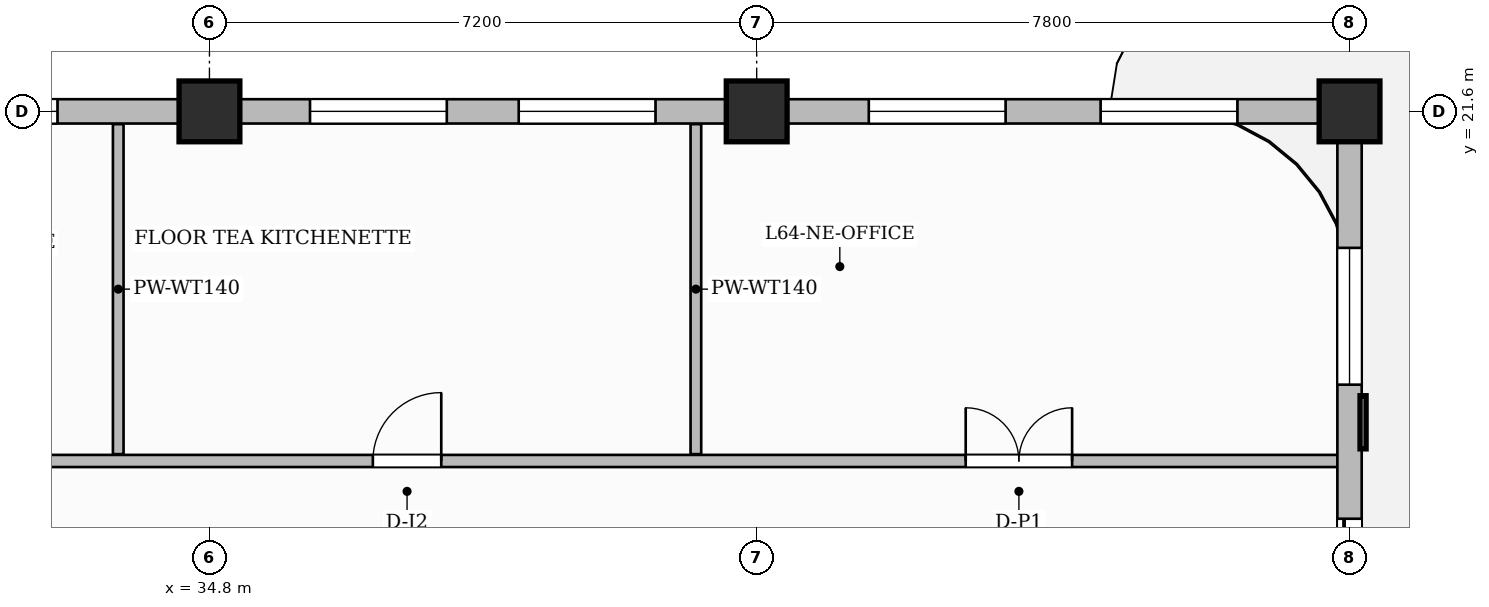
"""IFC4 building model, lengths in metres.
Left out: names, types, materials, properties, quantities, classifications, styles, units other than length and angle.
Written with IfcOpenShell. Run it as: python <this file> out.ifc"""

import sys

from ifc_helpers import new_model, si_unit, direction, frame, frame_2d, origin, origin_2d, place, context, subcontext, project, spatial, rectangle, extrude, source, transform, mapped, element, fill, save


model = new_model("IFC4")
c1 = context("Model", 3, precision=1e-05, world=origin(), true_north=direction((0.0, 1.0)))
c2 = subcontext(c1, "Body", "Model", "MODEL_VIEW")
j1 = project(units=[si_unit("LENGTHUNIT", "METRE"), si_unit("PLANEANGLEUNIT", "RADIAN")], contexts=[c1])
p1 = place(None, origin())
s1 = spatial("IfcSite", under=j1, at=p1, CompositionType="ELEMENT")
p2 = place(p1, origin())
s2 = spatial("IfcBuilding", under=s1, at=p2, CompositionType="ELEMENT")
p3 = place(p2, frame((0.0, 0.0, 255.8)))
s3 = spatial("IfcBuildingStorey", under=s2, at=p3, CompositionType="ELEMENT", Elevation=255.8)
m1 = source(origin(), c2, "Body", "SweptSolid", [
    extrude(rectangle(XDim=0.8, YDim=0.8, at=origin_2d()), origin(), (0.0, 0.0, 1.0), 3.85),
])
for number, where, z_axis, x_axis in (
    (1, (34.8, 21.6, 0.0), (0.0, 0.0, 1.0), (1.0, 0.0, 0.0)),
    (2, (42.0, 21.6, 0.0), (0.0, 0.0, 1.0), (1.0, 0.0, 0.0)),
    (3, (49.8, 21.6, 0.0), (0.0, 0.0, 1.0), (1.0, 0.0, 0.0)),
):
    element("IfcColumn", number, at=place(p3, frame(where, z_axis=z_axis, x_axis=x_axis)), inside=s3, PredefinedType="COLUMN", context=c2, shape_type="MappedRepresentation", body=[
        mapped(m1, transform((0.0, 0.0, 0.0), scale=1.0)),
    ])
p4 = place(p3, frame((30.29, 17.0, 0.0), z_axis=(0.0, 0.0, 1.0), x_axis=(1.0, 0.0, 0.0)))
e4 = element("IfcWall", 4, at=p4, inside=s3, PredefinedType="PARTITIONING", context=c2, shape_type="SweptSolid", body=[
    extrude(rectangle(XDim=19.37, YDim=0.16, at=frame_2d((9.685, 0.0))), origin(), (0.0, 0.0, 1.0), 3.6),
])
p5 = place(p4, frame((1.185, 0.0, 0.0)))
e5 = element("IfcOpeningElement", 5, at=p5, cuts=e4, PredefinedType="OPENING", context=c2, shape_type="SweptSolid", body=[
    extrude(rectangle(XDim=0.85, YDim=2.1, at=frame_2d((0.425, 1.05))), frame((0.0, 0.09, 0.0), z_axis=(0.0, -1.0, 0.0), x_axis=(1.0, 0.0, 0.0)), (0.0, 0.0, 1.0), 0.18),
])
p6 = place(p4, frame((6.66, 0.0, 0.0)))
e6 = element("IfcOpeningElement", 6, at=p6, cuts=e4, PredefinedType="OPENING", context=c2, shape_type="SweptSolid", body=[
    extrude(rectangle(XDim=0.9, YDim=2.15, at=frame_2d((0.45, 1.075))), frame((0.0, 0.09, 0.0), z_axis=(0.0, -1.0, 0.0), x_axis=(1.0, 0.0, 0.0)), (0.0, 0.0, 1.0), 0.18),
])
p7 = place(p4, frame((14.46, 0.0, 0.0)))
e7 = element("IfcOpeningElement", 7, at=p7, cuts=e4, PredefinedType="OPENING", context=c2, shape_type="SweptSolid", body=[
    extrude(rectangle(XDim=1.4, YDim=2.35, at=frame_2d((0.7, 1.175))), frame((0.0, 0.09, 0.0), z_axis=(0.0, -1.0, 0.0), x_axis=(1.0, 0.0, 0.0)), (0.0, 0.0, 1.0), 0.18),
])
for number, where, z_axis, x_axis in (
    (8, (33.6, 17.09, 0.0), (0.0, 0.0, 1.0), (0.0, 1.0, 0.0)),
    (9, (41.2, 17.09, 0.0), (0.0, 0.0, 1.0), (0.0, 1.0, 0.0)),
):
    element("IfcWall", number, at=place(p3, frame(where, z_axis=z_axis, x_axis=x_axis)), inside=s3, PredefinedType="PARTITIONING", context=c2, shape_type="SweptSolid", body=[
        extrude(rectangle(XDim=4.342, YDim=0.14, at=frame_2d((2.171, 0.0))), origin(), (0.0, 0.0, 1.0), 3.6),
    ])
p8 = place(p3, frame((49.8, 14.62, 0.0), z_axis=(0.0, 0.0, 1.0), x_axis=(0.0, 1.0, 0.0)))
e10 = element("IfcWall", 10, at=p8, inside=s3, PredefinedType="SOLIDWALL", context=c2, shape_type="SweptSolid", body=[
    extrude(rectangle(XDim=6.93, YDim=0.32, at=frame_2d((3.465, 0.0))), origin(), (0.0, 0.0, 1.0), 3.135),
])
p9 = place(p8, frame((0.42, 0.0, 0.0)))
e11 = element("IfcOpeningElement", 11, at=p9, cuts=e10, PredefinedType="OPENING", context=c2, shape_type="SweptSolid", body=[
    extrude(rectangle(XDim=1.2, YDim=2.2, at=frame_2d((0.6, 1.1))), frame((0.0, 0.17, 0.0), z_axis=(0.0, -1.0, 0.0), x_axis=(1.0, 0.0, 0.0)), (0.0, 0.0, 1.0), 0.34),
])
p10 = place(p8, frame((3.384, 0.0, 0.8)))
e12 = element("IfcOpeningElement", 12, at=p10, cuts=e10, PredefinedType="OPENING", context=c2, shape_type="SweptSolid", body=[
    extrude(rectangle(XDim=1.8, YDim=1.85, at=frame_2d((0.9, 0.925))), frame((0.0, 0.17, 0.0), z_axis=(0.0, -1.0, 0.0), x_axis=(1.0, 0.0, 0.0)), (0.0, 0.0, 1.0), 0.34),
])
p11 = place(p3, frame((18.0, 21.6, 0.0), z_axis=(0.0, 0.0, 1.0), x_axis=(1.0, 0.0, 0.0)))
e13 = element("IfcWall", 13, at=p11, inside=s3, PredefinedType="SOLIDWALL", context=c2, shape_type="SweptSolid", body=[
    extrude(rectangle(XDim=31.8, YDim=0.32, at=frame_2d((15.9, 0.0))), origin(), (0.0, 0.0, 1.0), 3.135),
])
p12 = place(p11, frame((0.42, 0.0, 0.0)))
e14 = element("IfcOpeningElement", 14, at=p12, cuts=e13, PredefinedType="OPENING", context=c2, shape_type="SweptSolid", body=[
    extrude(rectangle(XDim=1.2, YDim=2.2, at=frame_2d((0.6, 1.1))), frame((0.0, 0.17, 0.0), z_axis=(0.0, -1.0, 0.0), x_axis=(1.0, 0.0, 0.0)), (0.0, 0.0, 1.0), 0.34),
])
p13 = place(p11, frame((4.721, 0.0, 0.8)))
e15 = element("IfcOpeningElement", 15, at=p13, cuts=e13, PredefinedType="OPENING", context=c2, shape_type="SweptSolid", body=[
    extrude(rectangle(XDim=1.15, YDim=1.8, at=frame_2d((0.575, 0.9))), frame((0.0, 0.17, 0.0), z_axis=(0.0, -1.0, 0.0), x_axis=(1.0, 0.0, 0.0)), (0.0, 0.0, 1.0), 0.34),
])
p14 = place(p11, frame((7.204, 0.0, 0.8)))
e16 = element("IfcOpeningElement", 16, at=p14, cuts=e13, PredefinedType="OPENING", context=c2, shape_type="SweptSolid", body=[
    extrude(rectangle(XDim=1.8, YDim=1.85, at=frame_2d((0.9, 0.925))), frame((0.0, 0.17, 0.0), z_axis=(0.0, -1.0, 0.0), x_axis=(1.0, 0.0, 0.0)), (0.0, 0.0, 1.0), 0.34),
])
p15 = place(p11, frame((13.001, 0.0, 0.8)))
e17 = element("IfcOpeningElement", 17, at=p15, cuts=e13, PredefinedType="OPENING", context=c2, shape_type="SweptSolid", body=[
    extrude(rectangle(XDim=1.8, YDim=1.85, at=frame_2d((0.9, 0.925))), frame((0.0, 0.17, 0.0), z_axis=(0.0, -1.0, 0.0), x_axis=(1.0, 0.0, 0.0)), (0.0, 0.0, 1.0), 0.34),
])
p16 = place(p11, frame((18.123, 0.0, 0.8)))
e18 = element("IfcOpeningElement", 18, at=p16, cuts=e13, PredefinedType="OPENING", context=c2, shape_type="SweptSolid", body=[
    extrude(rectangle(XDim=1.8, YDim=1.85, at=frame_2d((0.9, 0.925))), frame((0.0, 0.17, 0.0), z_axis=(0.0, -1.0, 0.0), x_axis=(1.0, 0.0, 0.0)), (0.0, 0.0, 1.0), 0.34),
])
p17 = place(p11, frame((20.869, 0.0, 0.8)))
e19 = element("IfcOpeningElement", 19, at=p17, cuts=e13, PredefinedType="OPENING", context=c2, shape_type="SweptSolid", body=[
    extrude(rectangle(XDim=1.8, YDim=1.85, at=frame_2d((0.9, 0.925))), frame((0.0, 0.17, 0.0), z_axis=(0.0, -1.0, 0.0), x_axis=(1.0, 0.0, 0.0)), (0.0, 0.0, 1.0), 0.34),
])
p18 = place(p11, frame((25.475, 0.0, 0.8)))
e20 = element("IfcOpeningElement", 20, at=p18, cuts=e13, PredefinedType="OPENING", context=c2, shape_type="SweptSolid", body=[
    extrude(rectangle(XDim=1.8, YDim=1.85, at=frame_2d((0.9, 0.925))), frame((0.0, 0.17, 0.0), z_axis=(0.0, -1.0, 0.0), x_axis=(1.0, 0.0, 0.0)), (0.0, 0.0, 1.0), 0.34),
])
p19 = place(p11, frame((28.525, 0.0, 0.8)))
e21 = element("IfcOpeningElement", 21, at=p19, cuts=e13, PredefinedType="OPENING", context=c2, shape_type="SweptSolid", body=[
    extrude(rectangle(XDim=1.8, YDim=1.85, at=frame_2d((0.9, 0.925))), frame((0.0, 0.17, 0.0), z_axis=(0.0, -1.0, 0.0), x_axis=(1.0, 0.0, 0.0)), (0.0, 0.0, 1.0), 0.34),
])
m2 = source(origin(), c2, "Body", "SweptSolid", [
    extrude(rectangle(XDim=0.9, YDim=2.15, at=frame_2d((0.45, 1.075))), frame((0.0, 0.025, 0.0), z_axis=(0.0, -1.0, 0.0), x_axis=(1.0, 0.0, 0.0)), (0.0, 0.0, 1.0), 0.05),
])
p20 = place(p6, origin())
e22 = element("IfcDoor", 22, at=p20, inside=s3, OperationType="SINGLE_SWING_RIGHT", PredefinedType="DOOR", context=c2, shape_type="MappedRepresentation", body=[
    mapped(m2, transform((0.0, 0.0, 0.0), scale=1.0)),
])
fill(e6, e22)
m3 = source(origin(), c2, "Body", "SweptSolid", [
    extrude(rectangle(XDim=1.4, YDim=2.35, at=frame_2d((0.7, 1.175))), frame((0.0, 0.025, 0.0), z_axis=(0.0, -1.0, 0.0), x_axis=(1.0, 0.0, 0.0)), (0.0, 0.0, 1.0), 0.05),
])
p21 = place(p7, origin())
e23 = element("IfcDoor", 23, at=p21, inside=s3, OperationType="DOUBLE_DOOR_SINGLE_SWING", PredefinedType="DOOR", context=c2, shape_type="MappedRepresentation", body=[
    mapped(m3, transform((0.0, 0.0, 0.0), scale=1.0)),
])
fill(e7, e23)
m4 = source(origin(), c2, "Body", "SweptSolid", [
    extrude(rectangle(XDim=1.2, YDim=2.2, at=frame_2d((0.6, 1.1))), frame((0.0, 0.025, 0.0), z_axis=(0.0, -1.0, 0.0), x_axis=(1.0, 0.0, 0.0)), (0.0, 0.0, 1.0), 0.05),
])
p22 = place(p9, origin())
e24 = element("IfcDoor", 24, at=p22, inside=s3, OperationType="SLIDING_TO_LEFT", PredefinedType="DOOR", context=c2, shape_type="MappedRepresentation", body=[
    mapped(m4, transform((0.0, 0.0, 0.0), scale=1.0)),
])
fill(e11, e24)
m5 = source(origin(), c2, "Body", "SweptSolid", [
    extrude(rectangle(XDim=1.8, YDim=1.85, at=frame_2d((0.9, 0.925))), frame((0.0, 0.03, 0.0), z_axis=(0.0, -1.0, 0.0), x_axis=(1.0, 0.0, 0.0)), (0.0, 0.0, 1.0), 0.06),
])
p23 = place(p10, origin())
e25 = element("IfcWindow", 25, at=p23, inside=s3, PartitioningType="DOUBLE_PANEL_VERTICAL", PredefinedType="WINDOW", context=c2, shape_type="MappedRepresentation", body=[
    mapped(m5, transform((0.0, 0.0, 0.0), scale=1.0)),
])
fill(e12, e25)
p24 = place(p15, origin())
e26 = element("IfcWindow", 26, at=p24, inside=s3, PartitioningType="DOUBLE_PANEL_VERTICAL", PredefinedType="WINDOW", context=c2, shape_type="MappedRepresentation", body=[
    mapped(m5, transform((0.0, 0.0, 0.0), scale=1.0)),
])
fill(e17, e26)
p25 = place(p16, origin())
e27 = element("IfcWindow", 27, at=p25, inside=s3, PartitioningType="DOUBLE_PANEL_VERTICAL", PredefinedType="WINDOW", context=c2, shape_type="MappedRepresentation", body=[
    mapped(m5, transform((0.0, 0.0, 0.0), scale=1.0)),
])
fill(e18, e27)
p26 = place(p17, origin())
e28 = element("IfcWindow", 28, at=p26, inside=s3, PartitioningType="DOUBLE_PANEL_VERTICAL", PredefinedType="WINDOW", context=c2, shape_type="MappedRepresentation", body=[
    mapped(m5, transform((0.0, 0.0, 0.0), scale=1.0)),
])
fill(e19, e28)
p27 = place(p18, origin())
e29 = element("IfcWindow", 29, at=p27, inside=s3, PartitioningType="DOUBLE_PANEL_VERTICAL", PredefinedType="WINDOW", context=c2, shape_type="MappedRepresentation", body=[
    mapped(m5, transform((0.0, 0.0, 0.0), scale=1.0)),
])
fill(e20, e29)
p28 = place(p19, origin())
e30 = element("IfcWindow", 30, at=p28, inside=s3, PartitioningType="DOUBLE_PANEL_VERTICAL", PredefinedType="WINDOW", context=c2, shape_type="MappedRepresentation", body=[
    mapped(m5, transform((0.0, 0.0, 0.0), scale=1.0)),
])
fill(e21, e30)
save(model, sys.argv[1])
